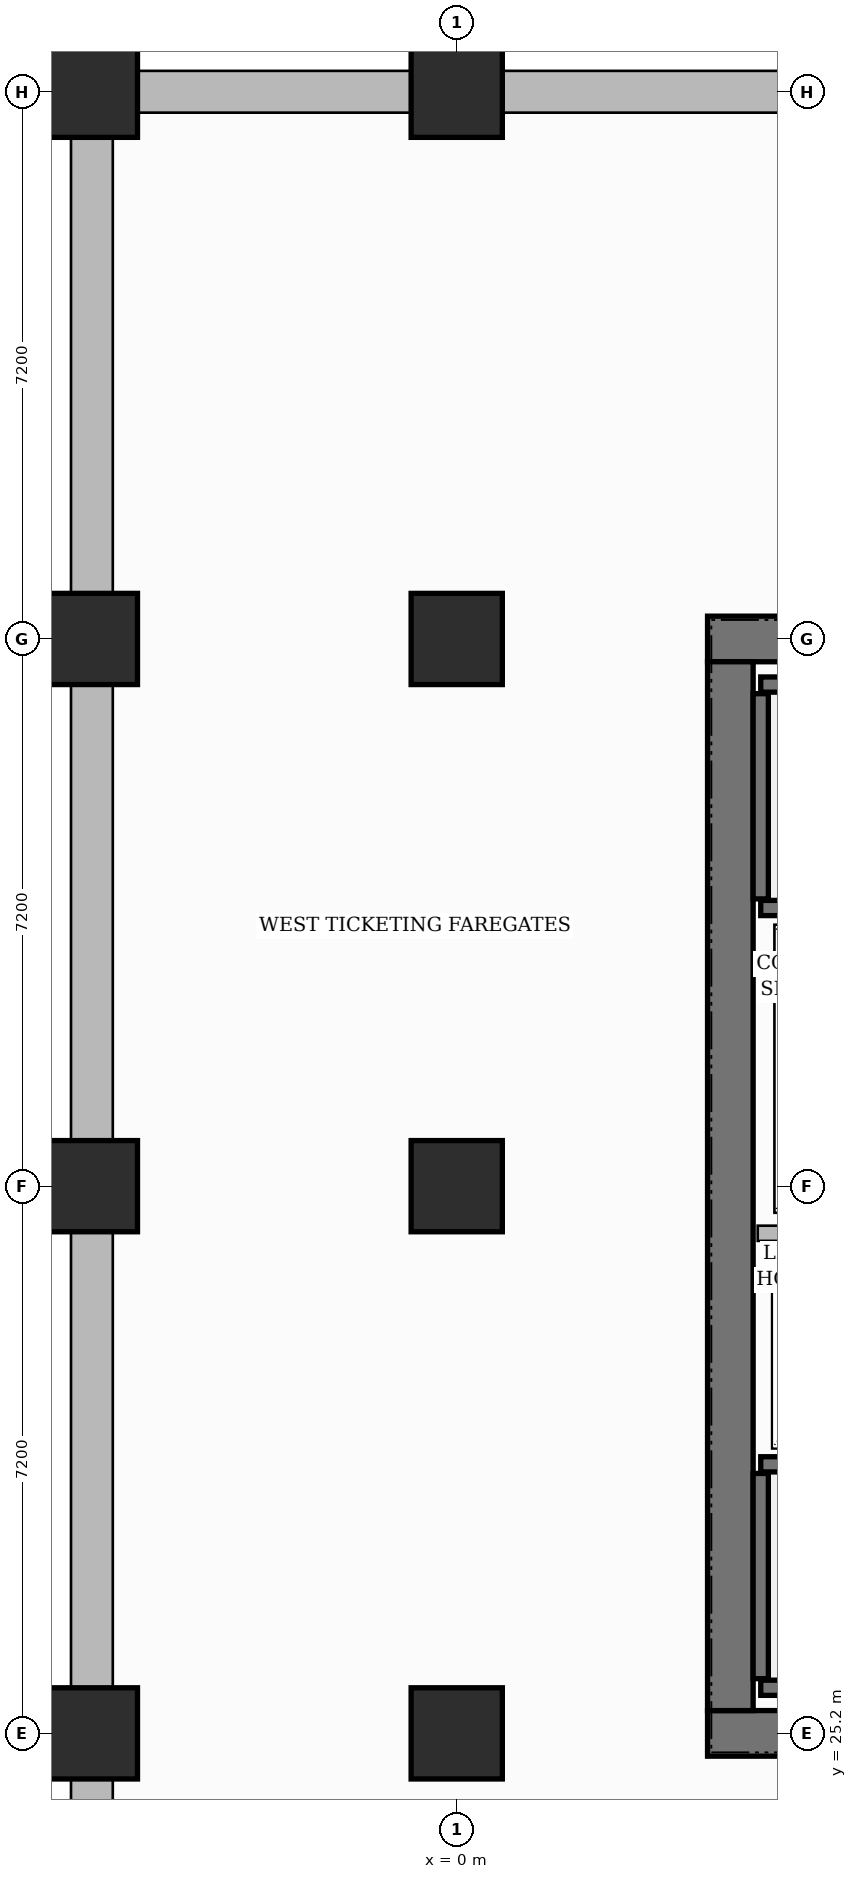
"""IFC4 building model, lengths in metres.
Left out: names, types, materials, properties, quantities, classifications, styles, units other than length and angle.
Written with IfcOpenShell. Run it as: python <this file> out.ifc"""

import sys

from ifc_helpers import new_model, si_unit, direction, frame, frame_2d, origin, origin_2d, place, context, subcontext, project, spatial, rectangle, extrude, source, transform, mapped, element, save


model = new_model("IFC4")
c1 = context("Model", 3, precision=1e-05, world=origin(), true_north=direction((0.0, 1.0)))
c2 = subcontext(c1, "Body", "Model", "MODEL_VIEW")
j1 = project(units=[si_unit("LENGTHUNIT", "METRE"), si_unit("PLANEANGLEUNIT", "RADIAN")], contexts=[c1])
p1 = place(None, origin())
s1 = spatial("IfcSite", under=j1, at=p1, CompositionType="ELEMENT")
p2 = place(p1, origin())
s2 = spatial("IfcBuilding", under=s1, at=p2, CompositionType="ELEMENT")
p3 = place(p2, frame((0.0, 0.0, -6.5)))
s3 = spatial("IfcBuildingStorey", under=s2, at=p3, CompositionType="ELEMENT", Elevation=-6.5)
p4 = place(p3, frame((80.4, 46.8, 0.0), z_axis=(0.0, 0.0, 1.0), x_axis=(-1.0, 0.0, 0.0)))
e1 = element("IfcWall", 1, at=p4, inside=s3, PredefinedType="USERDEFINED", context=c2, shape_type="SweptSolid", body=[
    extrude(rectangle(XDim=85.2, YDim=0.55, at=frame_2d((42.6, 0.0))), origin(), (0.0, 0.0, 1.0), 6.5),
])
p5 = place(p3, frame((-4.8, 46.45, 0.0), z_axis=(0.0, 0.0, 1.0), x_axis=(0.0, -1.0, 0.0)))
e2 = element("IfcWall", 2, at=p5, inside=s3, PredefinedType="USERDEFINED", context=c2, shape_type="SweptSolid", body=[
    extrude(rectangle(XDim=46.1, YDim=0.55, at=frame_2d((23.05, 0.0))), origin(), (0.0, 0.0, 1.0), 6.5),
])
for number, where, z_axis, x_axis in (
    (3, (3.3, 25.2, 0.0), (0.0, 0.0, 1.0), (1.0, 0.0, 0.0)),
    (4, (3.3, 39.6, 0.0), (0.0, 0.0, 1.0), (1.0, 0.0, 0.0)),
):
    element("IfcWall", number, at=place(p3, frame(where, z_axis=z_axis, x_axis=x_axis)), inside=s3, PredefinedType="SHEAR", context=c2, shape_type="SweptSolid", body=[
        extrude(rectangle(XDim=8.4, YDim=0.6, at=frame_2d((4.2, 0.0))), origin(), (0.0, 0.0, 1.0), 6.5),
    ])
p6 = place(p3, frame((3.6, 25.5, 0.0), z_axis=(0.0, 0.0, 1.0), x_axis=(0.0, 1.0, 0.0)))
e5 = element("IfcWall", 5, at=p6, inside=s3, PredefinedType="SHEAR", context=c2, shape_type="SweptSolid", body=[
    extrude(rectangle(XDim=13.8, YDim=0.6, at=frame_2d((6.9, 0.0))), origin(), (0.0, 0.0, 1.0), 6.5),
])
m1 = source(origin(), c2, "Body", "SweptSolid", [
    extrude(rectangle(XDim=1.2, YDim=1.2, at=origin_2d()), origin(), (0.0, 0.0, 1.0), 6.5),
])
for number, where, z_axis, x_axis in (
    (6, (-4.8, 25.2, 0.0), (0.0, 0.0, 1.0), (1.0, 0.0, 0.0)),
    (7, (-4.8, 32.4, 0.0), (0.0, 0.0, 1.0), (1.0, 0.0, 0.0)),
    (8, (-4.8, 39.6, 0.0), (0.0, 0.0, 1.0), (1.0, 0.0, 0.0)),
    (9, (-4.8, 46.8, 0.0), (0.0, 0.0, 1.0), (1.0, 0.0, 0.0)),
    (10, (0.0, 25.2, 0.0), (0.0, 0.0, 1.0), (1.0, 0.0, 0.0)),
    (11, (0.0, 32.4, 0.0), (0.0, 0.0, 1.0), (1.0, 0.0, 0.0)),
    (12, (0.0, 39.6, 0.0), (0.0, 0.0, 1.0), (1.0, 0.0, 0.0)),
    (13, (0.0, 46.8, 0.0), (0.0, 0.0, 1.0), (1.0, 0.0, 0.0)),
):
    element("IfcColumn", number, at=place(p3, frame(where, z_axis=z_axis, x_axis=x_axis)), inside=s3, PredefinedType="COLUMN", context=c2, shape_type="MappedRepresentation", body=[
        mapped(m1, transform((0.0, 0.0, 0.0), scale=1.0)),
    ])
p7 = place(p3, frame((4.0, 25.8, 0.0), z_axis=(0.0, 0.0, 1.0), x_axis=(1.0, 0.0, 0.0)))
e14 = element("IfcWall", 14, at=p7, inside=s3, PredefinedType="SHEAR", context=c2, shape_type="SweptSolid", body=[
    extrude(rectangle(XDim=7.1, YDim=0.2, at=frame_2d((3.55, 0.0))), origin(), (0.0, 0.0, 1.0), 6.5),
])
p8 = place(p3, frame((4.0, 25.92, 0.0), z_axis=(0.0, 0.0, 1.0), x_axis=(0.0, 1.0, 0.0)))
e15 = element("IfcWall", 15, at=p8, inside=s3, PredefinedType="SHEAR", context=c2, shape_type="SweptSolid", body=[
    extrude(rectangle(XDim=2.7, YDim=0.2, at=frame_2d((1.35, 0.0))), origin(), (0.0, 0.0, 1.0), 6.5),
])
p9 = place(p3, frame((4.0, 28.74, 0.0), z_axis=(0.0, 0.0, 1.0), x_axis=(1.0, 0.0, 0.0)))
e16 = element("IfcWall", 16, at=p9, inside=s3, PredefinedType="SHEAR", context=c2, shape_type="SweptSolid", body=[
    extrude(rectangle(XDim=7.1, YDim=0.2, at=frame_2d((3.55, 0.0))), origin(), (0.0, 0.0, 1.0), 6.5),
])
p10 = place(p9, frame((5.815, 0.0, 0.0)))
e17 = element("IfcOpeningElement", 17, at=p10, cuts=e16, PredefinedType="OPENING", context=c2, shape_type="SweptSolid", body=[
    extrude(rectangle(XDim=1.05, YDim=2.2, at=frame_2d((0.525, 1.1))), frame((0.0, 0.11, 0.0), z_axis=(0.0, -1.0, 0.0), x_axis=(1.0, 0.0, 0.0)), (0.0, 0.0, 1.0), 0.22),
])
p11 = place(p3, frame((4.0, 39.0, 0.0), z_axis=(0.0, 0.0, 1.0), x_axis=(1.0, 0.0, 0.0)))
e18 = element("IfcWall", 18, at=p11, inside=s3, PredefinedType="SHEAR", context=c2, shape_type="SweptSolid", body=[
    extrude(rectangle(XDim=7.1, YDim=0.2, at=frame_2d((3.55, 0.0))), origin(), (0.0, 0.0, 1.0), 6.5),
])
p12 = place(p3, frame((4.0, 36.18, 0.0), z_axis=(0.0, 0.0, 1.0), x_axis=(0.0, 1.0, 0.0)))
e19 = element("IfcWall", 19, at=p12, inside=s3, PredefinedType="SHEAR", context=c2, shape_type="SweptSolid", body=[
    extrude(rectangle(XDim=2.7, YDim=0.2, at=frame_2d((1.35, 0.0))), origin(), (0.0, 0.0, 1.0), 6.5),
])
p13 = place(p3, frame((4.0, 36.06, 0.0), z_axis=(0.0, 0.0, 1.0), x_axis=(1.0, 0.0, 0.0)))
e20 = element("IfcWall", 20, at=p13, inside=s3, PredefinedType="SHEAR", context=c2, shape_type="SweptSolid", body=[
    extrude(rectangle(XDim=7.1, YDim=0.2, at=frame_2d((3.55, 0.0))), origin(), (0.0, 0.0, 1.0), 6.5),
])
p14 = place(p13, frame((5.815, 0.0, 0.0)))
e21 = element("IfcOpeningElement", 21, at=p14, cuts=e20, PredefinedType="OPENING", context=c2, shape_type="SweptSolid", body=[
    extrude(rectangle(XDim=1.05, YDim=2.2, at=frame_2d((0.525, 1.1))), frame((0.0, 0.11, 0.0), z_axis=(0.0, -1.0, 0.0), x_axis=(1.0, 0.0, 0.0)), (0.0, 0.0, 1.0), 0.22),
])
p15 = place(p3, frame((3.96, 31.78, 0.0), z_axis=(0.0, 0.0, 1.0), x_axis=(1.0, 0.0, 0.0)))
e22 = element("IfcWall", 22, at=p15, inside=s3, PredefinedType="PARTITIONING", context=c2, shape_type="SweptSolid", body=[
    extrude(rectangle(XDim=2.13, YDim=0.2, at=frame_2d((1.065, 0.0))), origin(), (0.0, 0.0, 1.0), 6.1),
])
save(model, sys.argv[1])
